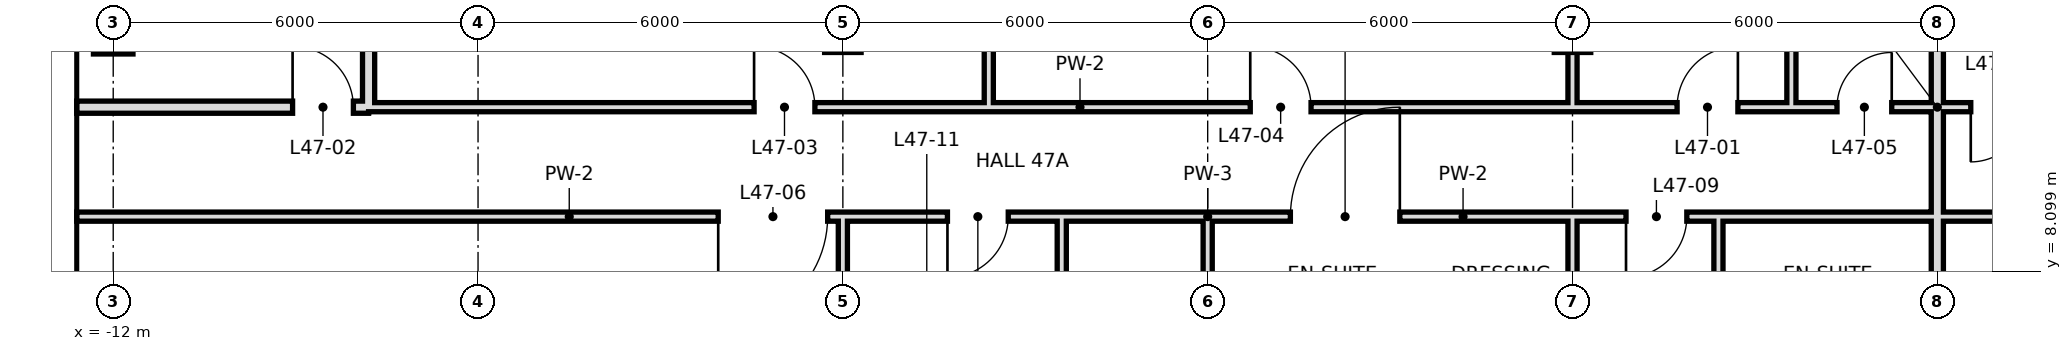
"""IFC4 building model, lengths in metres.
Left out: names, types, materials, properties, quantities, classifications, styles, units other than length and angle.
Written with IfcOpenShell. Run it as: python <this file> out.ifc"""

import sys

from ifc_helpers import new_model, si_unit, direction, frame, frame_2d, origin, origin_2d, place, context, subcontext, project, spatial, rectangle, hollow_rectangle, extrude, element, fill, save


model = new_model("IFC4")
c1 = context("Model", 3, precision=1e-05, world=origin(), true_north=direction((0.0, 1.0)))
c2 = subcontext(c1, "Body", "Model", "MODEL_VIEW")
j1 = project(units=[si_unit("LENGTHUNIT", "METRE"), si_unit("PLANEANGLEUNIT", "RADIAN")], contexts=[c1])
p1 = place(None, origin())
s1 = spatial("IfcSite", under=j1, at=p1, CompositionType="ELEMENT")
p2 = place(p1, origin())
s2 = spatial("IfcBuilding", under=s1, at=p2, CompositionType="ELEMENT")
p3 = place(p2, frame((0.0, 0.0, 202.8)))
s3 = spatial("IfcBuildingStorey", under=s2, at=p3, CompositionType="ELEMENT", Elevation=202.8)
p4 = place(p3, frame((-12.0, 12.0, 0.0), z_axis=(0.0, 0.0, 1.0), x_axis=(1.0, 0.0, 0.0)))
e1 = element("IfcColumn", 1, at=p4, inside=s3, PredefinedType="COLUMN", context=c2, shape_type="SweptSolid", body=[
    extrude(hollow_rectangle(XDim=0.65, YDim=0.65, WallThickness=0.032, at=origin_2d()), origin(), (0.0, 0.0, 1.0), 3.6),
])
p5 = place(p3, frame((-7.8, 10.8, 0.0), z_axis=(0.0, 0.0, 1.0), x_axis=(0.0, 1.0, 0.0)))
e2 = element("IfcWall", 2, at=p5, inside=s3, PredefinedType="SOLIDWALL", context=c2, shape_type="SweptSolid", body=[
    extrude(rectangle(XDim=7.2, YDim=0.2, at=frame_2d((3.6, 0.0))), origin(), (0.0, 0.0, 1.0), 2.72),
])
for number, where, z_axis, x_axis in (
    (3, (0.0, 0.0, 0.0), (0.0, 0.0, 1.0), (0.0, 1.0, 0.0)),
    (4, (12.0, 0.0, 0.0), (0.0, 0.0, 1.0), (0.0, 1.0, 0.0)),
):
    element("IfcWall", number, at=place(p3, frame(where, z_axis=z_axis, x_axis=x_axis)), inside=s3, PredefinedType="PARTITIONING", context=c2, shape_type="SweptSolid", body=[
        extrude(rectangle(XDim=9.0, YDim=0.15, at=frame_2d((4.5, 0.0))), origin(), (0.0, 0.0, 1.0), 2.72),
    ])
p6 = place(p3, frame((12.0, 10.8, 0.0), z_axis=(0.0, 0.0, 1.0), x_axis=(0.0, 1.0, 0.0)))
e5 = element("IfcWall", 5, at=p6, inside=s3, PredefinedType="PARTITIONING", context=c2, shape_type="SweptSolid", body=[
    extrude(rectangle(XDim=4.5, YDim=0.15, at=frame_2d((2.25, 0.0))), origin(), (0.0, 0.0, 1.0), 2.72),
])
p7 = place(p3, frame((14.4, 6.0, 0.0), z_axis=(0.0, 0.0, 1.0), x_axis=(0.0, 1.0, 0.0)))
e6 = element("IfcWall", 6, at=p7, inside=s3, PredefinedType="PARTITIONING", context=c2, shape_type="SweptSolid", body=[
    extrude(rectangle(XDim=3.0, YDim=0.15, at=frame_2d((1.5, 0.0))), origin(), (0.0, 0.0, 1.0), 3.42),
])
p8 = place(p3, frame((15.6, 10.8, 0.0), z_axis=(0.0, 0.0, 1.0), x_axis=(0.0, 1.0, 0.0)))
e7 = element("IfcWall", 7, at=p8, inside=s3, PredefinedType="PARTITIONING", context=c2, shape_type="SweptSolid", body=[
    extrude(rectangle(XDim=4.5, YDim=0.15, at=frame_2d((2.25, 0.0))), origin(), (0.0, 0.0, 1.0), 3.42),
])
p9 = place(p3, frame((18.0, -0.6, 0.0), z_axis=(0.0, 0.0, 1.0), x_axis=(0.0, 1.0, 0.0)))
e8 = element("IfcWall", 8, at=p9, inside=s3, PredefinedType="SOLIDWALL", context=c2, shape_type="SweptSolid", body=[
    extrude(rectangle(XDim=15.9, YDim=0.2, at=frame_2d((7.95, 0.0))), origin(), (0.0, 0.0, 1.0), 2.72),
])
p10 = place(p3, frame((2.4, 10.8, 0.0), z_axis=(0.0, 0.0, 1.0), x_axis=(0.0, 1.0, 0.0)))
e9 = element("IfcWall", 9, at=p10, inside=s3, PredefinedType="PARTITIONING", context=c2, shape_type="SweptSolid", body=[
    extrude(rectangle(XDim=7.2, YDim=0.15, at=frame_2d((3.6, 0.0))), origin(), (0.0, 0.0, 1.0), 3.42),
])
p11 = place(p3, frame((3.6, 6.0, 0.0), z_axis=(0.0, 0.0, 1.0), x_axis=(0.0, 1.0, 0.0)))
e10 = element("IfcWall", 10, at=p11, inside=s3, PredefinedType="PARTITIONING", context=c2, shape_type="SweptSolid", body=[
    extrude(rectangle(XDim=3.0, YDim=0.15, at=frame_2d((1.5, 0.0))), origin(), (0.0, 0.0, 1.0), 3.42),
])
p12 = place(p3, frame((6.0, 6.0, 0.0), z_axis=(0.0, 0.0, 1.0), x_axis=(0.0, 1.0, 0.0)))
e11 = element("IfcWall", 11, at=p12, inside=s3, PredefinedType="PARTITIONING", context=c2, shape_type="SweptSolid", body=[
    extrude(rectangle(XDim=3.0, YDim=0.15, at=frame_2d((1.5, 0.0))), origin(), (0.0, 0.0, 1.0), 2.72),
])
p13 = place(p3, frame((-12.6, 10.8, 0.0), z_axis=(0.0, 0.0, 1.0), x_axis=(1.0, 0.0, 0.0)))
e12 = element("IfcWall", 12, at=p13, inside=s3, PredefinedType="SOLIDWALL", context=c2, shape_type="SweptSolid", body=[
    extrude(rectangle(XDim=4.8, YDim=0.2, at=frame_2d((2.4, 0.0))), origin(), (0.0, 0.0, 1.0), 2.97),
])
p14 = place(p13, frame((3.55, 0.0, 0.0)))
e13 = element("IfcOpeningElement", 13, at=p14, cuts=e12, PredefinedType="OPENING", context=c2, shape_type="SweptSolid", body=[
    extrude(rectangle(XDim=1.0, YDim=2.4, at=frame_2d((0.5, 1.2))), frame((0.0, 0.11, 0.0), z_axis=(0.0, -1.0, 0.0), x_axis=(1.0, 0.0, 0.0)), (0.0, 0.0, 1.0), 0.22),
])
p15 = place(p3, frame((-7.8, 10.8, 0.0), z_axis=(0.0, 0.0, 1.0), x_axis=(1.0, 0.0, 0.0)))
e14 = element("IfcWall", 14, at=p15, inside=s3, PredefinedType="PARTITIONING", context=c2, shape_type="SweptSolid", body=[
    extrude(rectangle(XDim=23.4, YDim=0.15, at=frame_2d((11.7, 0.0))), origin(), (0.0, 0.0, 1.0), 3.42),
])
p16 = place(p15, frame((21.52, 0.0, 0.0)))
e15 = element("IfcOpeningElement", 15, at=p16, cuts=e14, PredefinedType="OPENING", context=c2, shape_type="SweptSolid", body=[
    extrude(rectangle(XDim=1.0, YDim=2.4, at=frame_2d((0.5, 1.2))), frame((0.0, 0.085, 0.0), z_axis=(0.0, -1.0, 0.0), x_axis=(1.0, 0.0, 0.0)), (0.0, 0.0, 1.0), 0.17),
])
p17 = place(p15, frame((6.34, 0.0, 0.0)))
e16 = element("IfcOpeningElement", 16, at=p17, cuts=e14, PredefinedType="OPENING", context=c2, shape_type="SweptSolid", body=[
    extrude(rectangle(XDim=1.0, YDim=2.4, at=frame_2d((0.5, 1.2))), frame((0.0, 0.085, 0.0), z_axis=(0.0, -1.0, 0.0), x_axis=(1.0, 0.0, 0.0)), (0.0, 0.0, 1.0), 0.17),
])
p18 = place(p15, frame((14.5, 0.0, 0.0)))
e17 = element("IfcOpeningElement", 17, at=p18, cuts=e14, PredefinedType="OPENING", context=c2, shape_type="SweptSolid", body=[
    extrude(rectangle(XDim=1.0, YDim=2.4, at=frame_2d((0.5, 1.2))), frame((0.0, 0.085, 0.0), z_axis=(0.0, -1.0, 0.0), x_axis=(1.0, 0.0, 0.0)), (0.0, 0.0, 1.0), 0.17),
])
p19 = place(p3, frame((15.6, 10.8, 0.0), z_axis=(0.0, 0.0, 1.0), x_axis=(1.0, 0.0, 0.0)))
e18 = element("IfcWall", 18, at=p19, inside=s3, PredefinedType="PARTITIONING", context=c2, shape_type="SweptSolid", body=[
    extrude(rectangle(XDim=4.8, YDim=0.15, at=frame_2d((2.4, 0.0))), origin(), (0.0, 0.0, 1.0), 3.42),
])
p20 = place(p19, frame((0.75, 0.0, 0.0)))
e19 = element("IfcOpeningElement", 19, at=p20, cuts=e18, PredefinedType="OPENING", context=c2, shape_type="SweptSolid", body=[
    extrude(rectangle(XDim=0.9, YDim=2.4, at=frame_2d((0.45, 1.2))), frame((0.0, 0.085, 0.0), z_axis=(0.0, -1.0, 0.0), x_axis=(1.0, 0.0, 0.0)), (0.0, 0.0, 1.0), 0.17),
])
p21 = place(p19, frame((2.95, 0.0, 0.0)))
e20 = element("IfcOpeningElement", 20, at=p21, cuts=e18, PredefinedType="OPENING", context=c2, shape_type="SweptSolid", body=[
    extrude(rectangle(XDim=0.9, YDim=2.4, at=frame_2d((0.45, 1.2))), frame((0.0, 0.085, 0.0), z_axis=(0.0, -1.0, 0.0), x_axis=(1.0, 0.0, 0.0)), (0.0, 0.0, 1.0), 0.17),
])
p22 = place(p3, frame((-12.6, 9.0, 0.0), z_axis=(0.0, 0.0, 1.0), x_axis=(1.0, 0.0, 0.0)))
e21 = element("IfcWall", 21, at=p22, inside=s3, PredefinedType="PARTITIONING", context=c2, shape_type="SweptSolid", body=[
    extrude(rectangle(XDim=16.2, YDim=0.15, at=frame_2d((8.1, 0.0))), origin(), (0.0, 0.0, 1.0), 3.42),
])
p23 = place(p22, frame((10.55, 0.0, 0.0)))
e22 = element("IfcOpeningElement", 22, at=p23, cuts=e21, PredefinedType="OPENING", context=c2, shape_type="SweptSolid", body=[
    extrude(rectangle(XDim=1.8, YDim=2.4, at=frame_2d((0.9, 1.2))), frame((0.0, 0.085, 0.0), z_axis=(0.0, -1.0, 0.0), x_axis=(1.0, 0.0, 0.0)), (0.0, 0.0, 1.0), 0.17),
])
p24 = place(p22, frame((14.32, 0.0, 0.0)))
e23 = element("IfcOpeningElement", 23, at=p24, cuts=e21, PredefinedType="OPENING", context=c2, shape_type="SweptSolid", body=[
    extrude(rectangle(XDim=1.0, YDim=2.4, at=frame_2d((0.5, 1.2))), frame((0.0, 0.085, 0.0), z_axis=(0.0, -1.0, 0.0), x_axis=(1.0, 0.0, 0.0)), (0.0, 0.0, 1.0), 0.17),
])
p25 = place(p3, frame((6.0, 9.0, 0.0), z_axis=(0.0, 0.0, 1.0), x_axis=(1.0, 0.0, 0.0)))
e24 = element("IfcWall", 24, at=p25, inside=s3, PredefinedType="PARTITIONING", context=c2, shape_type="SweptSolid", body=[
    extrude(rectangle(XDim=8.4, YDim=0.15, at=frame_2d((4.2, 0.0))), origin(), (0.0, 0.0, 1.0), 3.42),
])
p26 = place(p25, frame((1.36, 0.0, 0.0)))
e25 = element("IfcOpeningElement", 25, at=p26, cuts=e24, PredefinedType="OPENING", context=c2, shape_type="SweptSolid", body=[
    extrude(rectangle(XDim=1.8, YDim=2.4, at=frame_2d((0.9, 1.2))), frame((0.0, 0.085, 0.0), z_axis=(0.0, -1.0, 0.0), x_axis=(1.0, 0.0, 0.0)), (0.0, 0.0, 1.0), 0.17),
])
p27 = place(p25, frame((6.88, 0.0, 0.0)))
e26 = element("IfcOpeningElement", 26, at=p27, cuts=e24, PredefinedType="OPENING", context=c2, shape_type="SweptSolid", body=[
    extrude(rectangle(XDim=1.0, YDim=2.4, at=frame_2d((0.5, 1.2))), frame((0.0, 0.085, 0.0), z_axis=(0.0, -1.0, 0.0), x_axis=(1.0, 0.0, 0.0)), (0.0, 0.0, 1.0), 0.17),
])
p28 = place(p3, frame((18.0, 9.0, 0.0), z_axis=(0.0, 0.0, 1.0), x_axis=(1.0, 0.0, 0.0)))
e27 = element("IfcWall", 27, at=p28, inside=s3, PredefinedType="PARTITIONING", context=c2, shape_type="SweptSolid", body=[
    extrude(rectangle(XDim=15.6, YDim=0.15, at=frame_2d((7.8, 0.0))), origin(), (0.0, 0.0, 1.0), 3.42),
])
p29 = place(p28, frame((2.5, 0.0, 0.0)))
e28 = element("IfcOpeningElement", 28, at=p29, cuts=e27, PredefinedType="OPENING", context=c2, shape_type="SweptSolid", body=[
    extrude(rectangle(XDim=1.0, YDim=2.4, at=frame_2d((0.5, 1.2))), frame((0.0, 0.085, 0.0), z_axis=(0.0, -1.0, 0.0), x_axis=(1.0, 0.0, 0.0)), (0.0, 0.0, 1.0), 0.17),
])
p30 = place(p28, frame((8.84, 0.0, 0.0)))
e29 = element("IfcOpeningElement", 29, at=p30, cuts=e27, PredefinedType="OPENING", context=c2, shape_type="SweptSolid", body=[
    extrude(rectangle(XDim=1.8, YDim=2.4, at=frame_2d((0.9, 1.2))), frame((0.0, 0.085, 0.0), z_axis=(0.0, -1.0, 0.0), x_axis=(1.0, 0.0, 0.0)), (0.0, 0.0, 1.0), 0.17),
])
p31 = place(p28, frame((13.3, 0.0, 0.0)))
e30 = element("IfcOpeningElement", 30, at=p31, cuts=e27, PredefinedType="OPENING", context=c2, shape_type="SweptSolid", body=[
    extrude(rectangle(XDim=1.0, YDim=2.4, at=frame_2d((0.5, 1.2))), frame((0.0, 0.085, 0.0), z_axis=(0.0, -1.0, 0.0), x_axis=(1.0, 0.0, 0.0)), (0.0, 0.0, 1.0), 0.17),
])
p32 = place(p3, frame((3.6, 9.0, 0.0), z_axis=(0.0, 0.0, 1.0), x_axis=(1.0, 0.0, 0.0)))
e31 = element("IfcWall", 31, at=p32, inside=s3, PredefinedType="PARTITIONING", context=c2, shape_type="SweptSolid", body=[
    extrude(rectangle(XDim=2.4, YDim=0.15, at=frame_2d((1.2, 0.0))), origin(), (0.0, 0.0, 1.0), 3.42),
])
p33 = place(p3, frame((14.4, 9.0, 0.0), z_axis=(0.0, 0.0, 1.0), x_axis=(1.0, 0.0, 0.0)))
e32 = element("IfcWall", 32, at=p33, inside=s3, PredefinedType="PARTITIONING", context=c2, shape_type="SweptSolid", body=[
    extrude(rectangle(XDim=3.6, YDim=0.15, at=frame_2d((1.8, 0.0))), origin(), (0.0, 0.0, 1.0), 3.42),
])
p34 = place(p16, frame((1.0, 0.0, 0.0), z_axis=(0.0, 0.0, 1.0), x_axis=(-1.0, 0.0, 0.0)))
e33 = element("IfcDoor", 33, at=p34, inside=s3, OperationType="SINGLE_SWING_LEFT", PredefinedType="DOOR", context=c2, shape_type="SweptSolid", body=[
    extrude(rectangle(XDim=1.0, YDim=2.4, at=frame_2d((0.5, 1.2))), frame((0.0, 0.025, 0.0), z_axis=(0.0, -1.0, 0.0), x_axis=(1.0, 0.0, 0.0)), (0.0, 0.0, 1.0), 0.05),
])
fill(e15, e33)
p35 = place(p14, origin())
e34 = element("IfcDoor", 34, at=p35, inside=s3, OperationType="SINGLE_SWING_LEFT", PredefinedType="DOOR", context=c2, shape_type="SweptSolid", body=[
    extrude(rectangle(XDim=1.0, YDim=2.4, at=frame_2d((0.5, 1.2))), frame((0.0, 0.025, 0.0), z_axis=(0.0, -1.0, 0.0), x_axis=(1.0, 0.0, 0.0)), (0.0, 0.0, 1.0), 0.05),
])
fill(e13, e34)
p36 = place(p17, origin())
e35 = element("IfcDoor", 35, at=p36, inside=s3, OperationType="SINGLE_SWING_LEFT", PredefinedType="DOOR", context=c2, shape_type="SweptSolid", body=[
    extrude(rectangle(XDim=1.0, YDim=2.4, at=frame_2d((0.5, 1.2))), frame((0.0, 0.025, 0.0), z_axis=(0.0, -1.0, 0.0), x_axis=(1.0, 0.0, 0.0)), (0.0, 0.0, 1.0), 0.05),
])
fill(e16, e35)
p37 = place(p18, origin())
e36 = element("IfcDoor", 36, at=p37, inside=s3, OperationType="SINGLE_SWING_LEFT", PredefinedType="DOOR", context=c2, shape_type="SweptSolid", body=[
    extrude(rectangle(XDim=1.0, YDim=2.4, at=frame_2d((0.5, 1.2))), frame((0.0, 0.025, 0.0), z_axis=(0.0, -1.0, 0.0), x_axis=(1.0, 0.0, 0.0)), (0.0, 0.0, 1.0), 0.05),
])
fill(e17, e36)
p38 = place(p20, frame((0.9, 0.0, 0.0), z_axis=(0.0, 0.0, 1.0), x_axis=(-1.0, 0.0, 0.0)))
e37 = element("IfcDoor", 37, at=p38, inside=s3, OperationType="SINGLE_SWING_LEFT", PredefinedType="DOOR", context=c2, shape_type="SweptSolid", body=[
    extrude(rectangle(XDim=0.9, YDim=2.4, at=frame_2d((0.45, 1.2))), frame((0.0, 0.025, 0.0), z_axis=(0.0, -1.0, 0.0), x_axis=(1.0, 0.0, 0.0)), (0.0, 0.0, 1.0), 0.05),
])
fill(e19, e37)
p39 = place(p23, frame((1.8, 0.0, 0.0), z_axis=(0.0, 0.0, 1.0), x_axis=(-1.0, 0.0, 0.0)))
e38 = element("IfcDoor", 38, at=p39, inside=s3, OperationType="SINGLE_SWING_RIGHT", PredefinedType="DOOR", context=c2, shape_type="SweptSolid", body=[
    extrude(rectangle(XDim=1.8, YDim=2.4, at=frame_2d((0.9, 1.2))), frame((0.0, 0.025, 0.0), z_axis=(0.0, -1.0, 0.0), x_axis=(1.0, 0.0, 0.0)), (0.0, 0.0, 1.0), 0.05),
])
fill(e22, e38)
p40 = place(p24, frame((1.0, 0.0, 0.0), z_axis=(0.0, 0.0, 1.0), x_axis=(-1.0, 0.0, 0.0)))
e39 = element("IfcDoor", 39, at=p40, inside=s3, OperationType="SINGLE_SWING_RIGHT", PredefinedType="DOOR", context=c2, shape_type="SweptSolid", body=[
    extrude(rectangle(XDim=1.0, YDim=2.4, at=frame_2d((0.5, 1.2))), frame((0.0, 0.025, 0.0), z_axis=(0.0, -1.0, 0.0), x_axis=(1.0, 0.0, 0.0)), (0.0, 0.0, 1.0), 0.05),
])
fill(e23, e39)
p41 = place(p26, frame((1.8, 0.0, 0.0), z_axis=(0.0, 0.0, 1.0), x_axis=(-1.0, 0.0, 0.0)))
e40 = element("IfcDoor", 40, at=p41, inside=s3, OperationType="SINGLE_SWING_LEFT", PredefinedType="DOOR", context=c2, shape_type="SweptSolid", body=[
    extrude(rectangle(XDim=1.8, YDim=2.4, at=frame_2d((0.9, 1.2))), frame((0.0, 0.025, 0.0), z_axis=(0.0, -1.0, 0.0), x_axis=(1.0, 0.0, 0.0)), (0.0, 0.0, 1.0), 0.05),
])
fill(e25, e40)
p42 = place(p27, frame((1.0, 0.0, 0.0), z_axis=(0.0, 0.0, 1.0), x_axis=(-1.0, 0.0, 0.0)))
e41 = element("IfcDoor", 41, at=p42, inside=s3, OperationType="SINGLE_SWING_RIGHT", PredefinedType="DOOR", context=c2, shape_type="SweptSolid", body=[
    extrude(rectangle(XDim=1.0, YDim=2.4, at=frame_2d((0.5, 1.2))), frame((0.0, 0.025, 0.0), z_axis=(0.0, -1.0, 0.0), x_axis=(1.0, 0.0, 0.0)), (0.0, 0.0, 1.0), 0.05),
])
fill(e26, e41)
p43 = place(p21, frame((0.9, 0.0, 0.0), z_axis=(0.0, 0.0, 1.0), x_axis=(-1.0, 0.0, 0.0)))
e42 = element("IfcDoor", 42, at=p43, inside=s3, OperationType="SINGLE_SWING_RIGHT", PredefinedType="DOOR", context=c2, shape_type="SweptSolid", body=[
    extrude(rectangle(XDim=0.9, YDim=2.4, at=frame_2d((0.45, 1.2))), frame((0.0, 0.025, 0.0), z_axis=(0.0, -1.0, 0.0), x_axis=(1.0, 0.0, 0.0)), (0.0, 0.0, 1.0), 0.05),
])
fill(e20, e42)
save(model, sys.argv[1])
